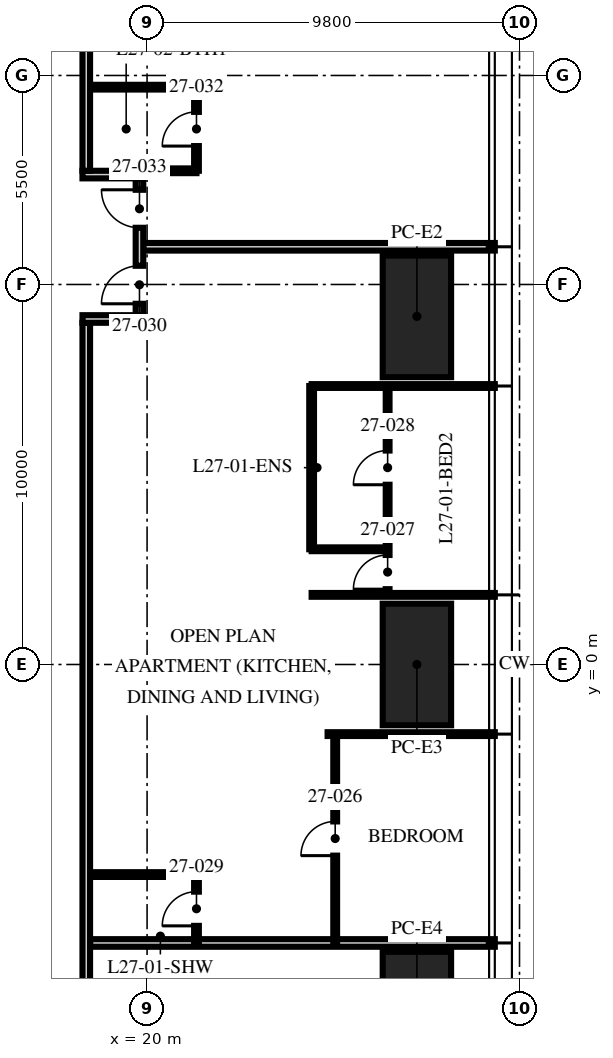
"""IFC4 building model, lengths in metres.
Left out: names, types, materials, properties, quantities, classifications, styles, units other than length and angle.
Written with IfcOpenShell. Run it as: python <this file> out.ifc"""

import sys

from ifc_helpers import new_model, si_unit, direction, frame, frame_2d, origin, origin_2d, place, context, subcontext, project, spatial, rectangle, hollow_rectangle, extrude, element, fill, save


model = new_model("IFC4")
c1 = context("Model", 3, precision=1e-05, world=origin(), true_north=direction((0.0, 1.0)))
c2 = subcontext(c1, "Body", "Model", "MODEL_VIEW")
j1 = project(units=[si_unit("LENGTHUNIT", "METRE"), si_unit("PLANEANGLEUNIT", "RADIAN")], contexts=[c1])
p1 = place(None, origin())
s1 = spatial("IfcSite", under=j1, at=p1, CompositionType="ELEMENT")
p2 = place(p1, origin())
s2 = spatial("IfcBuilding", under=s1, at=p2, CompositionType="ELEMENT")
p3 = place(p2, frame((0.0, 0.0, 111.0)))
s3 = spatial("IfcBuildingStorey", under=s2, at=p3, CompositionType="ELEMENT", Elevation=111.0)
for number, where, z_axis, x_axis in (
    (1, (27.1, 9.16, 0.0), (0.0, 0.0, 1.0), (0.0, 1.0, 0.0)),
    (2, (27.1, 0.0, 0.0), (0.0, 0.0, 1.0), (0.0, 1.0, 0.0)),
    (3, (27.1, -9.16, 0.0), (0.0, 0.0, 1.0), (0.0, 1.0, 0.0)),
):
    element("IfcColumn", number, at=place(p3, frame(where, z_axis=z_axis, x_axis=x_axis)), inside=s3, PredefinedType="COLUMN", context=c2, shape_type="SweptSolid", body=[
        extrude(hollow_rectangle(XDim=3.2, YDim=1.8, WallThickness=0.2, at=origin_2d()), origin(), (0.0, 0.0, 1.0), 3.75),
    ])
p4 = place(p3, frame((18.5, -7.328, 0.0), z_axis=(0.0, 0.0, 1.0), x_axis=(1.0, 0.0, 0.0)))
e4 = element("IfcWall", 4, at=p4, inside=s3, PredefinedType="PARTITIONING", context=c2, shape_type="SweptSolid", body=[
    extrude(rectangle(XDim=10.65, YDim=0.2, at=frame_2d((5.325, 0.0))), origin(), (0.0, 0.0, 1.0), 2.81),
])
p5 = place(p3, frame((24.75, -1.832, 0.0), z_axis=(0.0, 0.0, 1.0), x_axis=(1.0, 0.0, 0.0)))
e5 = element("IfcWall", 5, at=p5, inside=s3, PredefinedType="PARTITIONING", context=c2, shape_type="SweptSolid", body=[
    extrude(rectangle(XDim=4.4, YDim=0.1, at=frame_2d((2.2, 0.0))), origin(), (0.0, 0.0, 1.0), 2.81),
])
for number, where, z_axis, x_axis in (
    (6, (24.33, 1.832, 0.0), (0.0, 0.0, 1.0), (1.0, 0.0, 0.0)),
    (7, (24.33, 7.328, 0.0), (0.0, 0.0, 1.0), (1.0, 0.0, 0.0)),
):
    element("IfcWall", number, at=place(p3, frame(where, z_axis=z_axis, x_axis=x_axis)), inside=s3, PredefinedType="PARTITIONING", context=c2, shape_type="SweptSolid", body=[
        extrude(rectangle(XDim=4.82, YDim=0.1, at=frame_2d((2.41, 0.0))), origin(), (0.0, 0.0, 1.0), 2.81),
    ])
p6 = place(p3, frame((19.9, 10.992, 0.0), z_axis=(0.0, 0.0, 1.0), x_axis=(1.0, 0.0, 0.0)))
e8 = element("IfcWall", 8, at=p6, inside=s3, PredefinedType="PARTITIONING", context=c2, shape_type="SweptSolid", body=[
    extrude(rectangle(XDim=9.25, YDim=0.2, at=frame_2d((4.625, 0.0))), origin(), (0.0, 0.0, 1.0), 2.81),
])
p7 = place(p3, frame((24.95, -7.328, 0.0), z_axis=(0.0, 0.0, 1.0), x_axis=(0.0, 1.0, 0.0)))
e9 = element("IfcWall", 9, at=p7, inside=s3, PredefinedType="PARTITIONING", context=c2, shape_type="SweptSolid", body=[
    extrude(rectangle(XDim=5.496, YDim=0.1, at=frame_2d((2.748, 0.0))), origin(), (0.0, 0.0, 1.0), 2.81),
])
p8 = place(p7, frame((2.298, 0.0, 0.0)))
e10 = element("IfcOpeningElement", 10, at=p8, cuts=e9, PredefinedType="OPENING", context=c2, shape_type="SweptSolid", body=[
    extrude(rectangle(XDim=0.9, YDim=2.1, at=frame_2d((0.45, 1.05))), frame((0.0, 0.06, 0.0), z_axis=(0.0, -1.0, 0.0), x_axis=(1.0, 0.0, 0.0)), (0.0, 0.0, 1.0), 0.12),
])
p9 = place(p3, frame((26.33, 1.832, 0.0), z_axis=(0.0, 0.0, 1.0), x_axis=(0.0, 1.0, 0.0)))
e11 = element("IfcWall", 11, at=p9, inside=s3, PredefinedType="PARTITIONING", context=c2, shape_type="SweptSolid", body=[
    extrude(rectangle(XDim=5.496, YDim=0.1, at=frame_2d((2.748, 0.0))), origin(), (0.0, 0.0, 1.0), 2.81),
])
p10 = place(p9, frame((0.15, 0.0, 0.0)))
e12 = element("IfcOpeningElement", 12, at=p10, cuts=e11, PredefinedType="OPENING", context=c2, shape_type="SweptSolid", body=[
    extrude(rectangle(XDim=0.9, YDim=2.1, at=frame_2d((0.45, 1.05))), frame((0.0, 0.06, 0.0), z_axis=(0.0, -1.0, 0.0), x_axis=(1.0, 0.0, 0.0)), (0.0, 0.0, 1.0), 0.12),
])
p11 = place(p9, frame((2.898, 0.0, 0.0)))
e13 = element("IfcOpeningElement", 13, at=p11, cuts=e11, PredefinedType="OPENING", context=c2, shape_type="SweptSolid", body=[
    extrude(rectangle(XDim=0.9, YDim=2.1, at=frame_2d((0.45, 1.05))), frame((0.0, 0.06, 0.0), z_axis=(0.0, -1.0, 0.0), x_axis=(1.0, 0.0, 0.0)), (0.0, 0.0, 1.0), 0.12),
])
p12 = place(p3, frame((24.33, 3.032, 0.0), z_axis=(0.0, 0.0, 1.0), x_axis=(1.0, 0.0, 0.0)))
e14 = element("IfcWall", 14, at=p12, inside=s3, PredefinedType="PARTITIONING", context=c2, shape_type="SweptSolid", body=[
    extrude(rectangle(XDim=2.0, YDim=0.1, at=frame_2d((1.0, 0.0))), origin(), (0.0, 0.0, 1.0), 3.5),
])
p13 = place(p3, frame((24.33, 3.032, 0.0), z_axis=(0.0, 0.0, 1.0), x_axis=(0.0, 1.0, 0.0)))
e15 = element("IfcWall", 15, at=p13, inside=s3, PredefinedType="PARTITIONING", context=c2, shape_type="SweptSolid", body=[
    extrude(rectangle(XDim=4.296, YDim=0.125, at=frame_2d((2.148, 0.0))), origin(), (0.0, 0.0, 1.0), 2.81),
])
p14 = place(p3, frame((21.3, -7.328, 0.0), z_axis=(0.0, 0.0, 1.0), x_axis=(0.0, 1.0, 0.0)))
e16 = element("IfcWall", 16, at=p14, inside=s3, PredefinedType="PARTITIONING", context=c2, shape_type="SweptSolid", body=[
    extrude(rectangle(XDim=1.8, YDim=0.125, at=frame_2d((0.9, 0.0))), origin(), (0.0, 0.0, 1.0), 3.5),
])
p15 = place(p14, frame((0.45, 0.0, 0.0)))
e17 = element("IfcOpeningElement", 17, at=p15, cuts=e16, PredefinedType="OPENING", context=c2, shape_type="SweptSolid", body=[
    extrude(rectangle(XDim=0.9, YDim=2.1, at=frame_2d((0.45, 1.05))), frame((0.0, 0.073, 0.0), z_axis=(0.0, -1.0, 0.0), x_axis=(1.0, 0.0, 0.0)), (0.0, 0.0, 1.0), 0.145),
])
p16 = place(p3, frame((18.5, -5.528, 0.0), z_axis=(0.0, 0.0, 1.0), x_axis=(1.0, 0.0, 0.0)))
e18 = element("IfcWall", 18, at=p16, inside=s3, PredefinedType="PARTITIONING", context=c2, shape_type="SweptSolid", body=[
    extrude(rectangle(XDim=2.8, YDim=0.125, at=frame_2d((1.4, 0.0))), origin(), (0.0, 0.0, 1.0), 3.5),
])
p17 = place(p3, frame((21.3, 12.992, 0.0), z_axis=(0.0, 0.0, 1.0), x_axis=(0.0, 1.0, 0.0)))
e19 = element("IfcWall", 19, at=p17, inside=s3, PredefinedType="PARTITIONING", context=c2, shape_type="SweptSolid", body=[
    extrude(rectangle(XDim=2.2, YDim=0.125, at=frame_2d((1.1, 0.0))), origin(), (0.0, 0.0, 1.0), 2.81),
])
p18 = place(p17, frame((0.65, 0.0, 0.0)))
e20 = element("IfcOpeningElement", 20, at=p18, cuts=e19, PredefinedType="OPENING", context=c2, shape_type="SweptSolid", body=[
    extrude(rectangle(XDim=0.9, YDim=2.1, at=frame_2d((0.45, 1.05))), frame((0.0, 0.073, 0.0), z_axis=(0.0, -1.0, 0.0), x_axis=(1.0, 0.0, 0.0)), (0.0, 0.0, 1.0), 0.145),
])
p19 = place(p3, frame((19.97, 12.992, 0.0), z_axis=(0.0, 0.0, 1.0), x_axis=(1.0, 0.0, 0.0)))
e21 = element("IfcWall", 21, at=p19, inside=s3, PredefinedType="PARTITIONING", context=c2, shape_type="SweptSolid", body=[
    extrude(rectangle(XDim=1.33, YDim=0.125, at=frame_2d((0.665, 0.0))), origin(), (0.0, 0.0, 1.0), 3.5),
])
p20 = place(p3, frame((18.5, 15.192, 0.0), z_axis=(0.0, 0.0, 1.0), x_axis=(1.0, 0.0, 0.0)))
e22 = element("IfcWall", 22, at=p20, inside=s3, PredefinedType="PARTITIONING", context=c2, shape_type="SweptSolid", body=[
    extrude(rectangle(XDim=2.8, YDim=0.125, at=frame_2d((1.4, 0.0))), origin(), (0.0, 0.0, 1.0), 3.5),
])
p21 = place(p3, frame((18.4, -18.3, 0.0), z_axis=(0.0, 0.0, 1.0), x_axis=(0.0, 1.0, 0.0)))
e23 = element("IfcWall", 23, at=p21, inside=s3, PredefinedType="PARTITIONING", context=c2, shape_type="SweptSolid", body=[
    extrude(rectangle(XDim=27.292, YDim=0.2, at=frame_2d((13.646, 0.0))), origin(), (0.0, 0.0, 1.0), 2.3),
])
p22 = place(p3, frame((18.3, 9.092, 0.0), z_axis=(0.0, 0.0, 1.0), x_axis=(1.0, 0.0, 0.0)))
e24 = element("IfcWall", 24, at=p22, inside=s3, PredefinedType="PARTITIONING", context=c2, shape_type="SweptSolid", body=[
    extrude(rectangle(XDim=1.6, YDim=0.2, at=frame_2d((0.8, 0.0))), origin(), (0.0, 0.0, 1.0), 2.7),
])
p23 = place(p3, frame((18.3, 12.892, 0.0), z_axis=(0.0, 0.0, 1.0), x_axis=(1.0, 0.0, 0.0)))
e25 = element("IfcWall", 25, at=p23, inside=s3, PredefinedType="PARTITIONING", context=c2, shape_type="SweptSolid", body=[
    extrude(rectangle(XDim=1.6, YDim=0.2, at=frame_2d((0.8, 0.0))), origin(), (0.0, 0.0, 1.0), 3.5),
])
p24 = place(p3, frame((19.8, 9.192, 0.0), z_axis=(0.0, 0.0, 1.0), x_axis=(0.0, 1.0, 0.0)))
e26 = element("IfcWall", 26, at=p24, inside=s3, PredefinedType="PARTITIONING", context=c2, shape_type="SweptSolid", body=[
    extrude(rectangle(XDim=3.6, YDim=0.2, at=frame_2d((1.8, 0.0))), origin(), (0.0, 0.0, 1.0), 2.7),
])
p25 = place(p24, frame((0.3, 0.0, 0.0)))
e27 = element("IfcOpeningElement", 27, at=p25, cuts=e26, PredefinedType="OPENING", context=c2, shape_type="SweptSolid", body=[
    extrude(rectangle(XDim=1.0, YDim=2.2, at=frame_2d((0.5, 1.1))), frame((0.0, 0.11, 0.0), z_axis=(0.0, -1.0, 0.0), x_axis=(1.0, 0.0, 0.0)), (0.0, 0.0, 1.0), 0.22),
])
p26 = place(p24, frame((2.3, 0.0, 0.0)))
e28 = element("IfcOpeningElement", 28, at=p26, cuts=e26, PredefinedType="OPENING", context=c2, shape_type="SweptSolid", body=[
    extrude(rectangle(XDim=1.0, YDim=2.2, at=frame_2d((0.5, 1.1))), frame((0.0, 0.11, 0.0), z_axis=(0.0, -1.0, 0.0), x_axis=(1.0, 0.0, 0.0)), (0.0, 0.0, 1.0), 0.22),
])
p27 = place(p3, frame((18.4, 12.992, 0.0), z_axis=(0.0, 0.0, 1.0), x_axis=(0.0, 1.0, 0.0)))
e29 = element("IfcWall", 29, at=p27, inside=s3, PredefinedType="PARTITIONING", context=c2, shape_type="SweptSolid", body=[
    extrude(rectangle(XDim=3.708, YDim=0.2, at=frame_2d((1.854, 0.0))), origin(), (0.0, 0.0, 1.0), 2.81),
])
p28 = place(p8, origin())
e30 = element("IfcDoor", 30, at=p28, inside=s3, OperationType="SINGLE_SWING_LEFT", PredefinedType="DOOR", context=c2, shape_type="SweptSolid", body=[
    extrude(rectangle(XDim=0.9, YDim=2.1, at=frame_2d((0.45, 1.05))), frame((0.0, 0.025, 0.0), z_axis=(0.0, -1.0, 0.0), x_axis=(1.0, 0.0, 0.0)), (0.0, 0.0, 1.0), 0.05),
])
fill(e10, e30)
p29 = place(p10, origin())
e31 = element("IfcDoor", 31, at=p29, inside=s3, OperationType="SINGLE_SWING_LEFT", PredefinedType="DOOR", context=c2, shape_type="SweptSolid", body=[
    extrude(rectangle(XDim=0.9, YDim=2.1, at=frame_2d((0.45, 1.05))), frame((0.0, 0.025, 0.0), z_axis=(0.0, -1.0, 0.0), x_axis=(1.0, 0.0, 0.0)), (0.0, 0.0, 1.0), 0.05),
])
fill(e12, e31)
p30 = place(p11, origin())
e32 = element("IfcDoor", 32, at=p30, inside=s3, OperationType="SINGLE_SWING_LEFT", PredefinedType="DOOR", context=c2, shape_type="SweptSolid", body=[
    extrude(rectangle(XDim=0.9, YDim=2.1, at=frame_2d((0.45, 1.05))), frame((0.0, 0.025, 0.0), z_axis=(0.0, -1.0, 0.0), x_axis=(1.0, 0.0, 0.0)), (0.0, 0.0, 1.0), 0.05),
])
fill(e13, e32)
p31 = place(p15, origin())
e33 = element("IfcDoor", 33, at=p31, inside=s3, OperationType="SINGLE_SWING_LEFT", PredefinedType="DOOR", context=c2, shape_type="SweptSolid", body=[
    extrude(rectangle(XDim=0.9, YDim=2.1, at=frame_2d((0.45, 1.05))), frame((0.0, 0.025, 0.0), z_axis=(0.0, -1.0, 0.0), x_axis=(1.0, 0.0, 0.0)), (0.0, 0.0, 1.0), 0.05),
])
fill(e17, e33)
p32 = place(p25, origin())
e34 = element("IfcDoor", 34, at=p32, inside=s3, OperationType="SINGLE_SWING_LEFT", PredefinedType="DOOR", context=c2, shape_type="SweptSolid", body=[
    extrude(rectangle(XDim=1.0, YDim=2.2, at=frame_2d((0.5, 1.1))), frame((0.0, 0.025, 0.0), z_axis=(0.0, -1.0, 0.0), x_axis=(1.0, 0.0, 0.0)), (0.0, 0.0, 1.0), 0.05),
])
fill(e27, e34)
p33 = place(p18, origin())
e35 = element("IfcDoor", 35, at=p33, inside=s3, OperationType="SINGLE_SWING_LEFT", PredefinedType="DOOR", context=c2, shape_type="SweptSolid", body=[
    extrude(rectangle(XDim=0.9, YDim=2.1, at=frame_2d((0.45, 1.05))), frame((0.0, 0.025, 0.0), z_axis=(0.0, -1.0, 0.0), x_axis=(1.0, 0.0, 0.0)), (0.0, 0.0, 1.0), 0.05),
])
fill(e20, e35)
p34 = place(p26, origin())
e36 = element("IfcDoor", 36, at=p34, inside=s3, OperationType="SINGLE_SWING_RIGHT", PredefinedType="DOOR", context=c2, shape_type="SweptSolid", body=[
    extrude(rectangle(XDim=1.0, YDim=2.2, at=frame_2d((0.5, 1.1))), frame((0.0, 0.025, 0.0), z_axis=(0.0, -1.0, 0.0), x_axis=(1.0, 0.0, 0.0)), (0.0, 0.0, 1.0), 0.05),
])
fill(e28, e36)
save(model, sys.argv[1])
